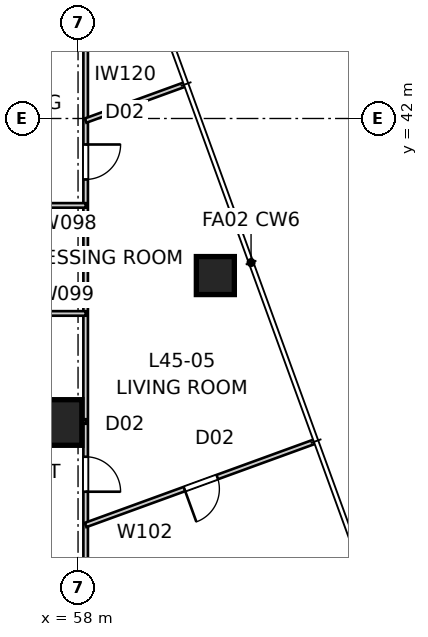
"""IFC4 building model, lengths in metres.
Left out: names, types, materials, properties, quantities, classifications, styles, units other than length and angle.
Written with IfcOpenShell. Run it as: python <this file> out.ifc"""

import sys

from ifc_helpers import new_model, si_unit, direction, frame, frame_2d, origin, origin_2d, place, context, subcontext, project, spatial, rectangle, extrude, element, fill, save


model = new_model("IFC4")
c1 = context("Model", 3, precision=1e-05, world=origin(), true_north=direction((0.0, 1.0)))
c2 = subcontext(c1, "Body", "Model", "MODEL_VIEW")
j1 = project(units=[si_unit("LENGTHUNIT", "METRE"), si_unit("PLANEANGLEUNIT", "RADIAN")], contexts=[c1])
p1 = place(None, origin())
s1 = spatial("IfcSite", under=j1, at=p1, CompositionType="ELEMENT")
p2 = place(p1, origin())
s2 = spatial("IfcBuilding", under=s1, at=p2, CompositionType="ELEMENT")
p3 = place(p2, frame((0.0, 0.0, 164.2)))
s3 = spatial("IfcBuildingStorey", under=s2, at=p3, CompositionType="ELEMENT", Elevation=164.2)
p4 = place(p3, frame((61.613, 37.866, 0.0), z_axis=(0.0, 0.0, 1.0), x_axis=(1.0, 0.0, 0.0)))
e1 = element("IfcColumn", 1, at=p4, inside=s3, PredefinedType="COLUMN", context=c2, shape_type="SweptSolid", body=[
    extrude(rectangle(XDim=1.0, YDim=1.0, at=origin_2d()), origin(), (0.0, 0.0, 1.0), 3.4),
])
p5 = place(p3, frame((57.5, 34.0, 0.0), z_axis=(0.0, 0.0, 1.0), x_axis=(1.0, 0.0, 0.0)))
e2 = element("IfcColumn", 2, at=p5, inside=s3, PredefinedType="COLUMN", context=c2, shape_type="SweptSolid", body=[
    extrude(rectangle(XDim=1.2, YDim=1.2, at=origin_2d()), origin(), (0.0, 0.0, 1.0), 3.4),
])
p6 = place(p3, frame((58.2, 47.266, 0.0), z_axis=(0.0, 0.0, 1.0), x_axis=(0.0, -1.0, 0.0)))
e3 = element("IfcWall", 3, at=p6, inside=s3, PredefinedType="PARTITIONING", context=c2, shape_type="SweptSolid", body=[
    extrude(rectangle(XDim=36.14, YDim=0.12, at=frame_2d((18.07, 0.0))), origin(), (0.0, 0.0, 1.0), 3.25),
])
p7 = place(p6, frame((2.227, 0.0, 0.0)))
e4 = element("IfcOpeningElement", 4, at=p7, cuts=e3, PredefinedType="OPENING", context=c2, shape_type="SweptSolid", body=[
    extrude(rectangle(XDim=0.92, YDim=2.34, at=frame_2d((0.46, 1.17))), frame((0.0, 0.07, 0.0), z_axis=(0.0, -1.0, 0.0), x_axis=(1.0, 0.0, 0.0)), (0.0, 0.0, 1.0), 0.14),
])
p8 = place(p6, frame((5.95, 0.0, 0.0)))
e5 = element("IfcOpeningElement", 5, at=p8, cuts=e3, PredefinedType="OPENING", context=c2, shape_type="SweptSolid", body=[
    extrude(rectangle(XDim=0.92, YDim=2.34, at=frame_2d((0.46, 1.17))), frame((0.0, 0.07, 0.0), z_axis=(0.0, -1.0, 0.0), x_axis=(1.0, 0.0, 0.0)), (0.0, 0.0, 1.0), 0.14),
])
p9 = place(p6, frame((29.769, 0.0, 0.0)))
e6 = element("IfcOpeningElement", 6, at=p9, cuts=e3, PredefinedType="OPENING", context=c2, shape_type="SweptSolid", body=[
    extrude(rectangle(XDim=0.92, YDim=2.34, at=frame_2d((0.46, 1.17))), frame((0.0, 0.07, 0.0), z_axis=(0.0, -1.0, 0.0), x_axis=(1.0, 0.0, 0.0)), (0.0, 0.0, 1.0), 0.14),
])
p10 = place(p6, frame((14.168, 0.0, 0.0)))
e7 = element("IfcOpeningElement", 7, at=p10, cuts=e3, PredefinedType="OPENING", context=c2, shape_type="SweptSolid", body=[
    extrude(rectangle(XDim=0.92, YDim=2.34, at=frame_2d((0.46, 1.17))), frame((0.0, 0.07, 0.0), z_axis=(0.0, -1.0, 0.0), x_axis=(1.0, 0.0, 0.0)), (0.0, 0.0, 1.0), 0.14),
])
p11 = place(p6, frame((33.434, 0.0, 0.0)))
e8 = element("IfcOpeningElement", 8, at=p11, cuts=e3, PredefinedType="OPENING", context=c2, shape_type="SweptSolid", body=[
    extrude(rectangle(XDim=0.92, YDim=2.34, at=frame_2d((0.46, 1.17))), frame((0.0, 0.07, 0.0), z_axis=(0.0, -1.0, 0.0), x_axis=(1.0, 0.0, 0.0)), (0.0, 0.0, 1.0), 0.14),
])
p12 = place(p3, frame((58.2, 39.713, 0.0), z_axis=(0.0, 0.0, 1.0), x_axis=(-1.0, 0.0, 0.0)))
e9 = element("IfcWall", 9, at=p12, inside=s3, PredefinedType="PARTITIONING", context=c2, shape_type="SweptSolid", body=[
    extrude(rectangle(XDim=4.4, YDim=0.12, at=frame_2d((2.2, 0.0))), origin(), (0.0, 0.0, 1.0), 3.25),
])
p13 = place(p12, frame((2.94, 0.0, 0.0)))
e10 = element("IfcOpeningElement", 10, at=p13, cuts=e9, PredefinedType="OPENING", context=c2, shape_type="SweptSolid", body=[
    extrude(rectangle(XDim=0.92, YDim=2.34, at=frame_2d((0.46, 1.17))), frame((0.0, 0.07, 0.0), z_axis=(0.0, -1.0, 0.0), x_axis=(1.0, 0.0, 0.0)), (0.0, 0.0, 1.0), 0.14),
])
p14 = place(p3, frame((53.8, 36.87, 0.0), z_axis=(0.0, 0.0, 1.0), x_axis=(1.0, 0.0, 0.0)))
e11 = element("IfcWall", 11, at=p14, inside=s3, PredefinedType="PARTITIONING", context=c2, shape_type="SweptSolid", body=[
    extrude(rectangle(XDim=4.4, YDim=0.12, at=frame_2d((2.2, 0.0))), origin(), (0.0, 0.0, 1.0), 3.25),
])
p15 = place(p14, frame((1.72, 0.0, 0.0)))
e12 = element("IfcOpeningElement", 12, at=p15, cuts=e11, PredefinedType="OPENING", context=c2, shape_type="SweptSolid", body=[
    extrude(rectangle(XDim=0.96, YDim=2.1, at=frame_2d((0.48, 1.05))), frame((0.0, 0.07, 0.0), z_axis=(0.0, -1.0, 0.0), x_axis=(1.0, 0.0, 0.0)), (0.0, 0.0, 1.0), 0.14),
])
p16 = place(p3, frame((58.2, 34.027, 0.0), z_axis=(0.0, 0.0, 1.0), x_axis=(-1.0, 0.0, 0.0)))
e13 = element("IfcWall", 13, at=p16, inside=s3, PredefinedType="PARTITIONING", context=c2, shape_type="SweptSolid", body=[
    extrude(rectangle(XDim=4.4, YDim=0.12, at=frame_2d((2.2, 0.0))), origin(), (0.0, 0.0, 1.0), 3.25),
])
p17 = place(p3, frame((64.225, 33.496, 0.0), z_axis=(0.0, 0.0, 1.0), x_axis=(-0.939697777766, -0.342005974306, 0.0)))
e14 = element("IfcWall", 14, at=p17, inside=s3, PredefinedType="PARTITIONING", context=c2, shape_type="SweptSolid", body=[
    extrude(rectangle(XDim=6.412, YDim=0.12, at=frame_2d((3.206, 0.0))), origin(), (0.0, 0.0, 1.0), 3.25),
])
p18 = place(p17, frame((2.726, 0.0, 0.0)))
e15 = element("IfcOpeningElement", 15, at=p18, cuts=e14, PredefinedType="OPENING", context=c2, shape_type="SweptSolid", body=[
    extrude(rectangle(XDim=0.92, YDim=2.34, at=frame_2d((0.46, 1.17))), frame((0.0, 0.07, 0.0), z_axis=(0.0, -1.0, 0.0), x_axis=(1.0, 0.0, 0.0)), (0.0, 0.0, 1.0), 0.14),
])
p19 = place(p3, frame((58.2, 41.945, 0.0), z_axis=(0.0, 0.0, 1.0), x_axis=(0.939680234176, 0.34205417334, 0.0)))
e16 = element("IfcWall", 16, at=p19, inside=s3, PredefinedType="PARTITIONING", context=c2, shape_type="SweptSolid", body=[
    extrude(rectangle(XDim=2.772, YDim=0.12, at=frame_2d((1.386, 0.0))), origin(), (0.0, 0.0, 1.0), 3.25),
])
p20 = place(p8, origin())
e17 = element("IfcDoor", 17, at=p20, inside=s3, OperationType="SINGLE_SWING_LEFT", PredefinedType="DOOR", context=c2, shape_type="SweptSolid", body=[
    extrude(rectangle(XDim=0.92, YDim=2.34, at=frame_2d((0.46, 1.17))), frame((0.0, 0.025, 0.0), z_axis=(0.0, -1.0, 0.0), x_axis=(1.0, 0.0, 0.0)), (0.0, 0.0, 1.0), 0.05),
])
fill(e5, e17)
p21 = place(p18, origin())
e18 = element("IfcDoor", 18, at=p21, inside=s3, OperationType="SINGLE_SWING_RIGHT", PredefinedType="DOOR", context=c2, shape_type="SweptSolid", body=[
    extrude(rectangle(XDim=0.92, YDim=2.34, at=frame_2d((0.46, 1.17))), frame((0.0, 0.025, 0.0), z_axis=(0.0, -1.0, 0.0), x_axis=(1.0, 0.0, 0.0)), (0.0, 0.0, 1.0), 0.05),
])
fill(e15, e18)
p22 = place(p10, origin())
e19 = element("IfcDoor", 19, at=p22, inside=s3, OperationType="SINGLE_SWING_RIGHT", PredefinedType="DOOR", context=c2, shape_type="SweptSolid", body=[
    extrude(rectangle(XDim=0.92, YDim=2.34, at=frame_2d((0.46, 1.17))), frame((0.0, 0.025, 0.0), z_axis=(0.0, -1.0, 0.0), x_axis=(1.0, 0.0, 0.0)), (0.0, 0.0, 1.0), 0.05),
])
fill(e7, e19)
save(model, sys.argv[1])
